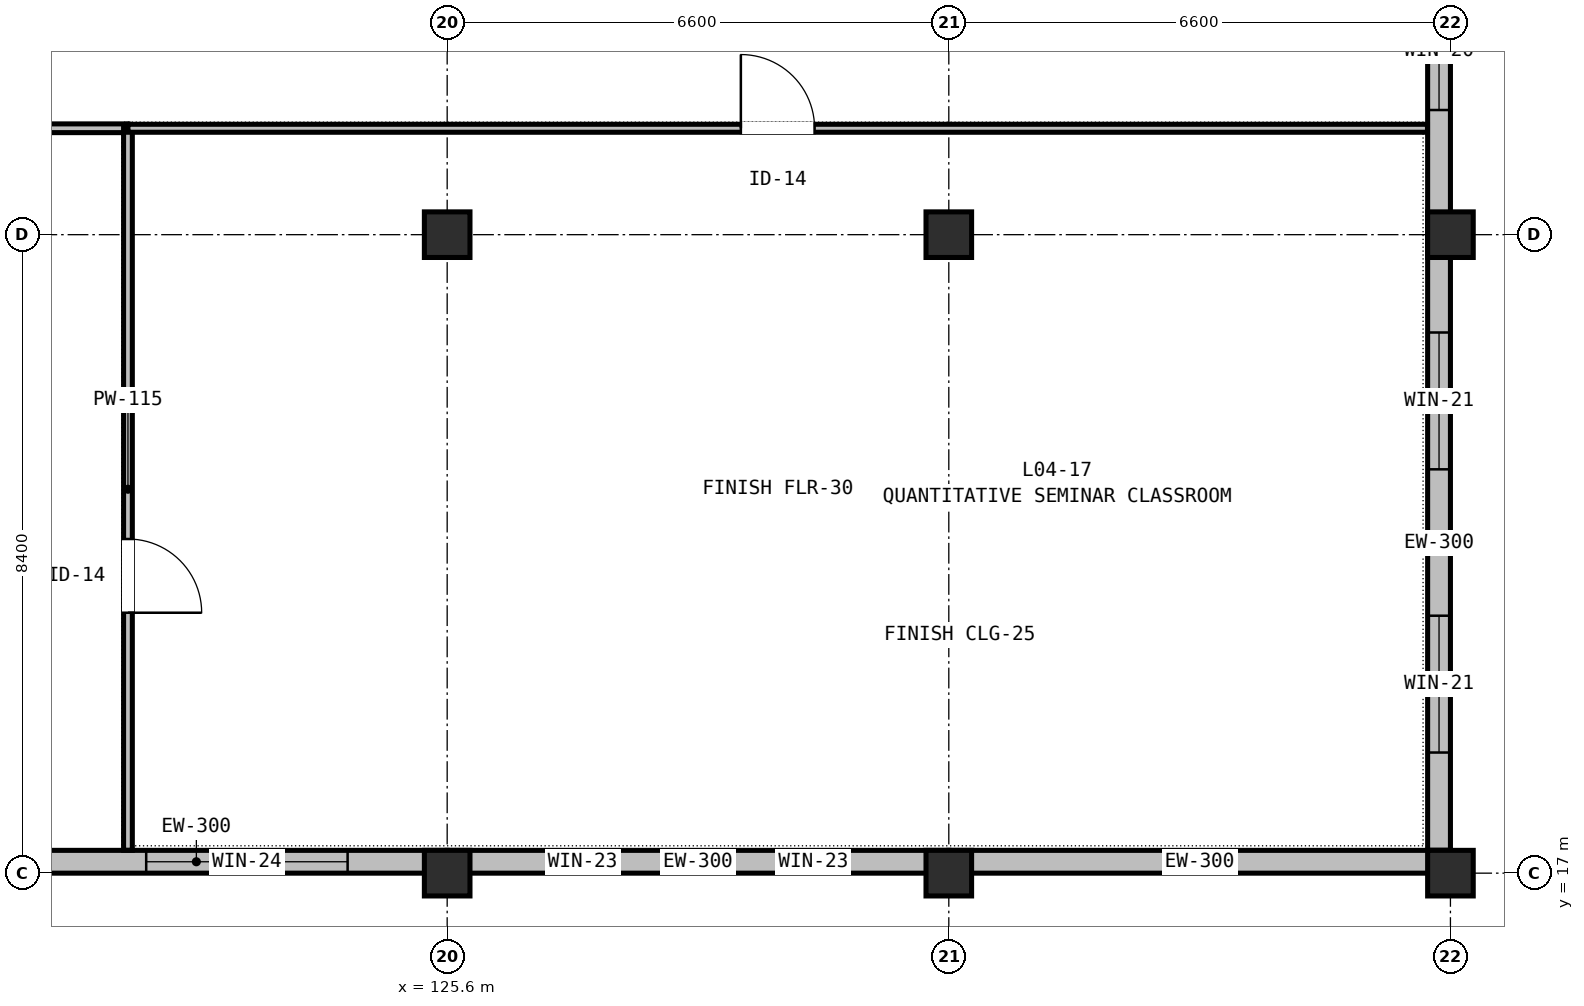
"""IFC4 building model, lengths in metres.
Left out: names, types, materials, properties, quantities, classifications, styles, units other than length and angle.
Written with IfcOpenShell. Run it as: python <this file> out.ifc"""

import sys

from ifc_helpers import new_model, si_unit, direction, frame, frame_2d, origin, origin_2d, place, context, subcontext, project, spatial, rectangle, extrude, element, fill, save


model = new_model("IFC4")
c1 = context("Model", 3, precision=1e-05, world=origin(), true_north=direction((0.0, 1.0)))
c2 = subcontext(c1, "Body", "Model", "MODEL_VIEW")
j1 = project(units=[si_unit("LENGTHUNIT", "METRE"), si_unit("PLANEANGLEUNIT", "RADIAN")], contexts=[c1])
p1 = place(None, origin())
s1 = spatial("IfcSite", under=j1, at=p1, CompositionType="ELEMENT")
p2 = place(p1, origin())
s2 = spatial("IfcBuilding", under=s1, at=p2, CompositionType="ELEMENT")
p3 = place(p2, frame((0.0, 0.0, 19.5)))
s3 = spatial("IfcBuildingStorey", under=s2, at=p3, CompositionType="ELEMENT", Elevation=19.5)
p4 = place(p3, frame((125.6, 17.0, 0.0), z_axis=(0.0, 0.0, 1.0), x_axis=(1.0, 0.0, 0.0)))
e1 = element("IfcColumn", 1, at=p4, inside=s3, PredefinedType="COLUMN", context=c2, shape_type="SweptSolid", body=[
    extrude(rectangle(XDim=0.6, YDim=0.6, at=origin_2d()), origin(), (0.0, 0.0, 1.0), 4.44),
])
p5 = place(p3, frame((125.6, 25.4, 0.0), z_axis=(0.0, 0.0, 1.0), x_axis=(1.0, 0.0, 0.0)))
e2 = element("IfcColumn", 2, at=p5, inside=s3, PredefinedType="COLUMN", context=c2, shape_type="SweptSolid", body=[
    extrude(rectangle(XDim=0.6, YDim=0.6, at=origin_2d()), origin(), (0.0, 0.0, 1.0), 4.5),
])
p6 = place(p3, frame((132.2, 17.0, 0.0), z_axis=(0.0, 0.0, 1.0), x_axis=(1.0, 0.0, 0.0)))
e3 = element("IfcColumn", 3, at=p6, inside=s3, PredefinedType="COLUMN", context=c2, shape_type="SweptSolid", body=[
    extrude(rectangle(XDim=0.6, YDim=0.6, at=origin_2d()), origin(), (0.0, 0.0, 1.0), 4.44),
])
p7 = place(p3, frame((132.2, 25.4, 0.0), z_axis=(0.0, 0.0, 1.0), x_axis=(1.0, 0.0, 0.0)))
e4 = element("IfcColumn", 4, at=p7, inside=s3, PredefinedType="COLUMN", context=c2, shape_type="SweptSolid", body=[
    extrude(rectangle(XDim=0.6, YDim=0.6, at=origin_2d()), origin(), (0.0, 0.0, 1.0), 4.5),
])
p8 = place(p3, frame((138.8, 17.0, 0.0), z_axis=(0.0, 0.0, 1.0), x_axis=(1.0, 0.0, 0.0)))
e5 = element("IfcColumn", 5, at=p8, inside=s3, PredefinedType="COLUMN", context=c2, shape_type="SweptSolid", body=[
    extrude(rectangle(XDim=0.6, YDim=0.6, at=origin_2d()), origin(), (0.0, 0.0, 1.0), 4.44),
])
p9 = place(p3, frame((138.8, 25.4, 0.0), z_axis=(0.0, 0.0, 1.0), x_axis=(1.0, 0.0, 0.0)))
e6 = element("IfcColumn", 6, at=p9, inside=s3, PredefinedType="COLUMN", context=c2, shape_type="SweptSolid", body=[
    extrude(rectangle(XDim=0.6, YDim=0.6, at=origin_2d()), origin(), (0.0, 0.0, 1.0), 4.5),
])
p10 = place(p3, frame((138.65, 33.5, 0.0), z_axis=(0.0, 0.0, 1.0), x_axis=(0.0, -1.0, 0.0)))
e7 = element("IfcWall", 7, at=p10, inside=s3, PredefinedType="STANDARD", context=c2, shape_type="SweptSolid", body=[
    extrude(rectangle(XDim=8.1, YDim=0.3, at=frame_2d((4.05, 0.0))), origin(), (0.0, 0.0, 1.0), 3.885),
])
p11 = place(p10, frame((1.412, 0.0, 0.75)))
e8 = element("IfcOpeningElement", 8, at=p11, cuts=e7, PredefinedType="OPENING", context=c2, shape_type="SweptSolid", body=[
    extrude(rectangle(XDim=1.55, YDim=2.4, at=frame_2d((0.775, 1.2))), frame((0.0, 0.16, 0.0), z_axis=(0.0, -1.0, 0.0), x_axis=(1.0, 0.0, 0.0)), (0.0, 0.0, 1.0), 0.32),
])
p12 = place(p10, frame((4.91, 0.0, 0.75)))
e9 = element("IfcOpeningElement", 9, at=p12, cuts=e7, PredefinedType="OPENING", context=c2, shape_type="SweptSolid", body=[
    extrude(rectangle(XDim=1.55, YDim=2.4, at=frame_2d((0.775, 1.2))), frame((0.0, 0.16, 0.0), z_axis=(0.0, -1.0, 0.0), x_axis=(1.0, 0.0, 0.0)), (0.0, 0.0, 1.0), 0.32),
])
p13 = place(p3, frame((138.65, 25.4, 0.0), z_axis=(0.0, 0.0, 1.0), x_axis=(0.0, -1.0, 0.0)))
e10 = element("IfcWall", 10, at=p13, inside=s3, PredefinedType="STANDARD", context=c2, shape_type="SweptSolid", body=[
    extrude(rectangle(XDim=8.1, YDim=0.3, at=frame_2d((4.05, 0.0))), origin(), (0.0, 0.0, 1.0), 3.885),
])
p14 = place(p13, frame((1.287, 0.0, 0.75)))
e11 = element("IfcOpeningElement", 11, at=p14, cuts=e10, PredefinedType="OPENING", context=c2, shape_type="SweptSolid", body=[
    extrude(rectangle(XDim=1.8, YDim=2.4, at=frame_2d((0.9, 1.2))), frame((0.0, 0.16, 0.0), z_axis=(0.0, -1.0, 0.0), x_axis=(1.0, 0.0, 0.0)), (0.0, 0.0, 1.0), 0.32),
])
p15 = place(p13, frame((5.013, 0.0, 0.75)))
e12 = element("IfcOpeningElement", 12, at=p15, cuts=e10, PredefinedType="OPENING", context=c2, shape_type="SweptSolid", body=[
    extrude(rectangle(XDim=1.8, YDim=2.4, at=frame_2d((0.9, 1.2))), frame((0.0, 0.16, 0.0), z_axis=(0.0, -1.0, 0.0), x_axis=(1.0, 0.0, 0.0)), (0.0, 0.0, 1.0), 0.32),
])
p16 = place(p3, frame((138.8, 17.15, 0.0), z_axis=(0.0, 0.0, 1.0), x_axis=(-1.0, 0.0, 0.0)))
e13 = element("IfcWall", 13, at=p16, inside=s3, PredefinedType="STANDARD", context=c2, shape_type="SweptSolid", body=[
    extrude(rectangle(XDim=6.6, YDim=0.3, at=frame_2d((3.3, 0.0))), origin(), (0.0, 0.0, 1.0), 3.735),
])
p17 = place(p3, frame((132.2, 17.15, 0.0), z_axis=(0.0, 0.0, 1.0), x_axis=(-1.0, 0.0, 0.0)))
e14 = element("IfcWall", 14, at=p17, inside=s3, PredefinedType="STANDARD", context=c2, shape_type="SweptSolid", body=[
    extrude(rectangle(XDim=6.6, YDim=0.3, at=frame_2d((3.3, 0.0))), origin(), (0.0, 0.0, 1.0), 3.735),
])
p18 = place(p17, frame((1.307, 0.0, 0.9)))
e15 = element("IfcOpeningElement", 15, at=p18, cuts=e14, PredefinedType="OPENING", context=c2, shape_type="SweptSolid", body=[
    extrude(rectangle(XDim=0.95, YDim=1.8, at=frame_2d((0.475, 0.9))), frame((0.0, 0.16, 0.0), z_axis=(0.0, -1.0, 0.0), x_axis=(1.0, 0.0, 0.0)), (0.0, 0.0, 1.0), 0.32),
])
p19 = place(p17, frame((4.343, 0.0, 0.9)))
e16 = element("IfcOpeningElement", 16, at=p19, cuts=e14, PredefinedType="OPENING", context=c2, shape_type="SweptSolid", body=[
    extrude(rectangle(XDim=0.95, YDim=1.8, at=frame_2d((0.475, 0.9))), frame((0.0, 0.16, 0.0), z_axis=(0.0, -1.0, 0.0), x_axis=(1.0, 0.0, 0.0)), (0.0, 0.0, 1.0), 0.32),
])
p20 = place(p3, frame((125.6, 17.15, 0.0), z_axis=(0.0, 0.0, 1.0), x_axis=(-1.0, 0.0, 0.0)))
e17 = element("IfcWall", 17, at=p20, inside=s3, PredefinedType="STANDARD", context=c2, shape_type="SweptSolid", body=[
    extrude(rectangle(XDim=6.6, YDim=0.3, at=frame_2d((3.3, 0.0))), origin(), (0.0, 0.0, 1.0), 3.735),
])
p21 = place(p20, frame((1.31, 0.0, 0.9)))
e18 = element("IfcOpeningElement", 18, at=p21, cuts=e17, PredefinedType="OPENING", context=c2, shape_type="SweptSolid", body=[
    extrude(rectangle(XDim=2.65, YDim=1.85, at=frame_2d((1.325, 0.925))), frame((0.0, 0.16, 0.0), z_axis=(0.0, -1.0, 0.0), x_axis=(1.0, 0.0, 0.0)), (0.0, 0.0, 1.0), 0.32),
])
p22 = place(p3, frame((112.702, 26.8, 0.0), z_axis=(0.0, 0.0, 1.0), x_axis=(1.0, 0.0, 0.0)))
e19 = element("IfcWall", 19, at=p22, inside=s3, PredefinedType="PARTITIONING", context=c2, shape_type="SweptSolid", body=[
    extrude(rectangle(XDim=8.698, YDim=0.115, at=frame_2d((4.349, 0.0))), origin(), (0.0, 0.0, 1.0), 3.735),
])
p23 = place(p22, frame((3.884, 0.0, 0.0)))
e20 = element("IfcOpeningElement", 20, at=p23, cuts=e19, PredefinedType="OPENING", context=c2, shape_type="SweptSolid", body=[
    extrude(rectangle(XDim=0.93, YDim=2.1, at=frame_2d((0.465, 1.05))), frame((0.0, 0.067, 0.0), z_axis=(0.0, -1.0, 0.0), x_axis=(1.0, 0.0, 0.0)), (0.0, 0.0, 1.0), 0.135),
])
p24 = place(p3, frame((121.4, 26.8, 0.0), z_axis=(0.0, 0.0, 1.0), x_axis=(0.0, -1.0, 0.0)))
e21 = element("IfcWall", 21, at=p24, inside=s3, PredefinedType="PARTITIONING", context=c2, shape_type="SweptSolid", body=[
    extrude(rectangle(XDim=9.498, YDim=0.115, at=frame_2d((4.749, 0.0))), origin(), (0.0, 0.0, 1.0), 3.885),
])
p25 = place(p24, frame((5.404, 0.0, 0.0)))
e22 = element("IfcOpeningElement", 22, at=p25, cuts=e21, PredefinedType="OPENING", context=c2, shape_type="SweptSolid", body=[
    extrude(rectangle(XDim=0.97, YDim=2.1, at=frame_2d((0.485, 1.05))), frame((0.0, 0.067, 0.0), z_axis=(0.0, -1.0, 0.0), x_axis=(1.0, 0.0, 0.0)), (0.0, 0.0, 1.0), 0.135),
])
p26 = place(p3, frame((121.4, 26.8, 0.0), z_axis=(0.0, 0.0, 1.0), x_axis=(1.0, 0.0, 0.0)))
e23 = element("IfcWall", 23, at=p26, inside=s3, PredefinedType="PARTITIONING", context=c2, shape_type="SweptSolid", body=[
    extrude(rectangle(XDim=17.098, YDim=0.105, at=frame_2d((8.549, 0.0))), origin(), (0.0, 0.0, 1.0), 3.735),
])
p27 = place(p26, frame((8.064, 0.0, 0.0)))
e24 = element("IfcOpeningElement", 24, at=p27, cuts=e23, PredefinedType="OPENING", context=c2, shape_type="SweptSolid", body=[
    extrude(rectangle(XDim=0.97, YDim=2.1, at=frame_2d((0.485, 1.05))), frame((0.0, 0.062, 0.0), z_axis=(0.0, -1.0, 0.0), x_axis=(1.0, 0.0, 0.0)), (0.0, 0.0, 1.0), 0.125),
])
p28 = place(p12, origin())
e25 = element("IfcWindow", 25, at=p28, inside=s3, PartitioningType="SINGLE_PANEL", PredefinedType="WINDOW", context=c2, shape_type="SweptSolid", body=[
    extrude(rectangle(XDim=1.55, YDim=2.4, at=frame_2d((0.775, 1.2))), frame((0.0, 0.03, 0.0), z_axis=(0.0, -1.0, 0.0), x_axis=(1.0, 0.0, 0.0)), (0.0, 0.0, 1.0), 0.06),
])
fill(e9, e25)
p29 = place(p14, origin())
e26 = element("IfcWindow", 26, at=p29, inside=s3, PartitioningType="SINGLE_PANEL", PredefinedType="WINDOW", context=c2, shape_type="SweptSolid", body=[
    extrude(rectangle(XDim=1.8, YDim=2.4, at=frame_2d((0.9, 1.2))), frame((0.0, 0.03, 0.0), z_axis=(0.0, -1.0, 0.0), x_axis=(1.0, 0.0, 0.0)), (0.0, 0.0, 1.0), 0.06),
])
fill(e11, e26)
p30 = place(p15, origin())
e27 = element("IfcWindow", 27, at=p30, inside=s3, PartitioningType="SINGLE_PANEL", PredefinedType="WINDOW", context=c2, shape_type="SweptSolid", body=[
    extrude(rectangle(XDim=1.8, YDim=2.4, at=frame_2d((0.9, 1.2))), frame((0.0, 0.03, 0.0), z_axis=(0.0, -1.0, 0.0), x_axis=(1.0, 0.0, 0.0)), (0.0, 0.0, 1.0), 0.06),
])
fill(e12, e27)
p31 = place(p18, origin())
e28 = element("IfcWindow", 28, at=p31, inside=s3, PartitioningType="SINGLE_PANEL", PredefinedType="WINDOW", context=c2, shape_type="SweptSolid", body=[
    extrude(rectangle(XDim=0.95, YDim=1.8, at=frame_2d((0.475, 0.9))), frame((0.0, 0.03, 0.0), z_axis=(0.0, -1.0, 0.0), x_axis=(1.0, 0.0, 0.0)), (0.0, 0.0, 1.0), 0.06),
])
fill(e15, e28)
p32 = place(p19, origin())
e29 = element("IfcWindow", 29, at=p32, inside=s3, PartitioningType="SINGLE_PANEL", PredefinedType="WINDOW", context=c2, shape_type="SweptSolid", body=[
    extrude(rectangle(XDim=0.95, YDim=1.8, at=frame_2d((0.475, 0.9))), frame((0.0, 0.03, 0.0), z_axis=(0.0, -1.0, 0.0), x_axis=(1.0, 0.0, 0.0)), (0.0, 0.0, 1.0), 0.06),
])
fill(e16, e29)
p33 = place(p21, origin())
e30 = element("IfcWindow", 30, at=p33, inside=s3, PartitioningType="SINGLE_PANEL", PredefinedType="WINDOW", context=c2, shape_type="SweptSolid", body=[
    extrude(rectangle(XDim=2.65, YDim=1.85, at=frame_2d((1.325, 0.925))), frame((0.0, 0.03, 0.0), z_axis=(0.0, -1.0, 0.0), x_axis=(1.0, 0.0, 0.0)), (0.0, 0.0, 1.0), 0.06),
])
fill(e18, e30)
p34 = place(p27, origin())
e31 = element("IfcDoor", 31, at=p34, inside=s3, OperationType="SINGLE_SWING_LEFT", PredefinedType="DOOR", context=c2, shape_type="SweptSolid", body=[
    extrude(rectangle(XDim=0.97, YDim=2.1, at=frame_2d((0.485, 1.05))), frame((0.0, 0.025, 0.0), z_axis=(0.0, -1.0, 0.0), x_axis=(1.0, 0.0, 0.0)), (0.0, 0.0, 1.0), 0.05),
])
fill(e24, e31)
p35 = place(p25, origin())
e32 = element("IfcDoor", 32, at=p35, inside=s3, OperationType="SINGLE_SWING_RIGHT", PredefinedType="DOOR", context=c2, shape_type="SweptSolid", body=[
    extrude(rectangle(XDim=0.97, YDim=2.1, at=frame_2d((0.485, 1.05))), frame((0.0, 0.025, 0.0), z_axis=(0.0, -1.0, 0.0), x_axis=(1.0, 0.0, 0.0)), (0.0, 0.0, 1.0), 0.05),
])
fill(e22, e32)
save(model, sys.argv[1])
